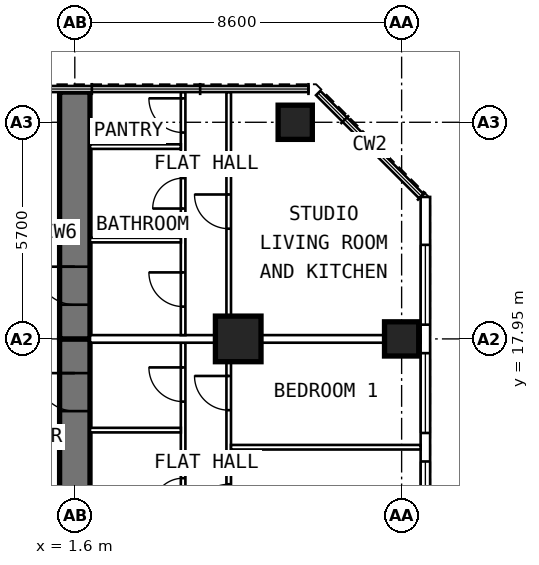
"""IFC4 building model, lengths in metres.
Left out: names, types, materials, properties, quantities, classifications, styles, units other than length and angle.
Written with IfcOpenShell. Run it as: python <this file> out.ifc"""

import sys

from ifc_helpers import new_model, si_unit, direction, frame, frame_2d, origin, origin_2d, place, context, subcontext, project, spatial, rectangle, extrude, element, fill, save


model = new_model("IFC4")
c1 = context("Model", 3, precision=1e-05, world=origin(), true_north=direction((0.0, 1.0)))
c2 = subcontext(c1, "Body", "Model", "MODEL_VIEW")
j1 = project(units=[si_unit("LENGTHUNIT", "METRE"), si_unit("PLANEANGLEUNIT", "RADIAN")], contexts=[c1])
p1 = place(None, origin())
s1 = spatial("IfcSite", under=j1, at=p1, CompositionType="ELEMENT")
p2 = place(p1, origin())
s2 = spatial("IfcBuilding", under=s1, at=p2, CompositionType="ELEMENT")
p3 = place(p2, frame((0.0, 0.0, 158.0)))
s3 = spatial("IfcBuildingStorey", under=s2, at=p3, CompositionType="ELEMENT", Elevation=158.0)
for number, where, z_axis, x_axis in (
    (1, (10.2, 17.95, 0.0), (0.0, 0.0, 1.0), (0.0, 1.0, 0.0)),
    (2, (7.4, 23.65, 0.0), (0.0, 0.0, 1.0), (0.0, 1.0, 0.0)),
):
    element("IfcColumn", number, at=place(p3, frame(where, z_axis=z_axis, x_axis=x_axis)), inside=s3, PredefinedType="COLUMN", context=c2, shape_type="SweptSolid", body=[
        extrude(rectangle(XDim=0.9, YDim=0.9, at=origin_2d()), origin(), (0.0, 0.0, 1.0), 3.6),
    ])
p4 = place(p3, frame((5.9, 17.95, 0.0), z_axis=(0.0, 0.0, 1.0), x_axis=(0.0, 1.0, 0.0)))
e3 = element("IfcColumn", 3, at=p4, inside=s3, PredefinedType="COLUMN", context=c2, shape_type="SweptSolid", body=[
    extrude(rectangle(XDim=1.2, YDim=1.2, at=origin_2d()), origin(), (0.0, 0.0, 1.0), 3.6),
])
p5 = place(p3, frame((1.6, 9.6, 0.0), z_axis=(0.0, 0.0, 1.0), x_axis=(0.0, 1.0, 0.0)))
e4 = element("IfcWall", 4, at=p5, inside=s3, PredefinedType="SHEAR", context=c2, shape_type="SweptSolid", body=[
    extrude(rectangle(XDim=8.35, YDim=0.8, at=frame_2d((4.175, 0.0))), origin(), (0.0, 0.0, 1.0), 3.6),
])
p6 = place(p5, frame((6.45, 0.0, 0.0)))
e5 = element("IfcOpeningElement", 5, at=p6, cuts=e4, PredefinedType="OPENING", context=c2, shape_type="SweptSolid", body=[
    extrude(rectangle(XDim=1.0, YDim=2.1, at=frame_2d((0.5, 1.05))), frame((0.0, 0.412, 0.0), z_axis=(0.0, -1.0, 0.0), x_axis=(1.0, 0.0, 0.0)), (0.0, 0.0, 1.0), 0.824),
])
p7 = place(p3, frame((1.6, 17.95, 0.0), z_axis=(0.0, 0.0, 1.0), x_axis=(0.0, 1.0, 0.0)))
e6 = element("IfcWall", 6, at=p7, inside=s3, PredefinedType="SHEAR", context=c2, shape_type="SweptSolid", body=[
    extrude(rectangle(XDim=6.495, YDim=0.8, at=frame_2d((3.248, 0.0))), origin(), (0.0, 0.0, 1.0), 3.6),
])
p8 = place(p7, frame((0.9, 0.0, 0.0)))
e7 = element("IfcOpeningElement", 7, at=p8, cuts=e6, PredefinedType="OPENING", context=c2, shape_type="SweptSolid", body=[
    extrude(rectangle(XDim=1.0, YDim=2.1, at=frame_2d((0.5, 1.05))), frame((0.0, 0.412, 0.0), z_axis=(0.0, -1.0, 0.0), x_axis=(1.0, 0.0, 0.0)), (0.0, 0.0, 1.0), 0.824),
])
p9 = place(p3, frame((10.825, 6.409, 0.0), z_axis=(0.0, 0.0, 1.0), x_axis=(0.0, 1.0, 0.0)))
e8 = element("IfcWall", 8, at=p9, inside=s3, PredefinedType="SOLIDWALL", context=c2, shape_type="SweptSolid", body=[
    extrude(rectangle(XDim=15.276, YDim=0.25, at=frame_2d((7.638, 0.0))), origin(), (0.0, 0.0, 1.0), 3.35),
])
p10 = place(p9, frame((0.516, 0.0, 0.8)))
e9 = element("IfcOpeningElement", 9, at=p10, cuts=e8, PredefinedType="OPENING", context=c2, shape_type="SweptSolid", body=[
    extrude(rectangle(XDim=2.1, YDim=1.8, at=frame_2d((1.05, 0.9))), frame((0.0, 0.137, 0.0), z_axis=(0.0, -1.0, 0.0), x_axis=(1.0, 0.0, 0.0)), (0.0, 0.0, 1.0), 0.274),
])
p11 = place(p9, frame((3.366, 0.0, 0.8)))
e10 = element("IfcOpeningElement", 10, at=p11, cuts=e8, PredefinedType="OPENING", context=c2, shape_type="SweptSolid", body=[
    extrude(rectangle(XDim=2.1, YDim=1.8, at=frame_2d((1.05, 0.9))), frame((0.0, 0.137, 0.0), z_axis=(0.0, -1.0, 0.0), x_axis=(1.0, 0.0, 0.0)), (0.0, 0.0, 1.0), 0.274),
])
p12 = place(p9, frame((6.216, 0.0, 0.8)))
e11 = element("IfcOpeningElement", 11, at=p12, cuts=e8, PredefinedType="OPENING", context=c2, shape_type="SweptSolid", body=[
    extrude(rectangle(XDim=2.1, YDim=1.8, at=frame_2d((1.05, 0.9))), frame((0.0, 0.137, 0.0), z_axis=(0.0, -1.0, 0.0), x_axis=(1.0, 0.0, 0.0)), (0.0, 0.0, 1.0), 0.274),
])
p13 = place(p9, frame((9.066, 0.0, 0.8)))
e12 = element("IfcOpeningElement", 12, at=p13, cuts=e8, PredefinedType="OPENING", context=c2, shape_type="SweptSolid", body=[
    extrude(rectangle(XDim=2.1, YDim=1.8, at=frame_2d((1.05, 0.9))), frame((0.0, 0.137, 0.0), z_axis=(0.0, -1.0, 0.0), x_axis=(1.0, 0.0, 0.0)), (0.0, 0.0, 1.0), 0.274),
])
p14 = place(p9, frame((11.916, 0.0, 0.8)))
e13 = element("IfcOpeningElement", 13, at=p14, cuts=e8, PredefinedType="OPENING", context=c2, shape_type="SweptSolid", body=[
    extrude(rectangle(XDim=2.1, YDim=1.8, at=frame_2d((1.05, 0.9))), frame((0.0, 0.137, 0.0), z_axis=(0.0, -1.0, 0.0), x_axis=(1.0, 0.0, 0.0)), (0.0, 0.0, 1.0), 0.274),
])
p15 = place(p3, frame((4.45, 10.05, 0.0), z_axis=(0.0, 0.0, 1.0), x_axis=(0.0, 1.0, 0.0)))
e14 = element("IfcWall", 14, at=p15, inside=s3, PredefinedType="PARTITIONING", context=c2, shape_type="SweptSolid", body=[
    extrude(rectangle(XDim=7.8, YDim=0.12, at=frame_2d((3.9, 0.0))), origin(), (0.0, 0.0, 1.0), 3.35),
])
p16 = place(p15, frame((0.61, 0.0, 0.0)))
e15 = element("IfcOpeningElement", 15, at=p16, cuts=e14, PredefinedType="OPENING", context=c2, shape_type="SweptSolid", body=[
    extrude(rectangle(XDim=0.9, YDim=2.1, at=frame_2d((0.45, 1.05))), frame((0.0, 0.072, 0.0), z_axis=(0.0, -1.0, 0.0), x_axis=(1.0, 0.0, 0.0)), (0.0, 0.0, 1.0), 0.144),
])
p17 = place(p15, frame((3.435, 0.0, 0.0)))
e16 = element("IfcOpeningElement", 16, at=p17, cuts=e14, PredefinedType="OPENING", context=c2, shape_type="SweptSolid", body=[
    extrude(rectangle(XDim=0.8, YDim=2.1, at=frame_2d((0.4, 1.05))), frame((0.0, 0.072, 0.0), z_axis=(0.0, -1.0, 0.0), x_axis=(1.0, 0.0, 0.0)), (0.0, 0.0, 1.0), 0.144),
])
p18 = place(p15, frame((6.25, 0.0, 0.0)))
e17 = element("IfcOpeningElement", 17, at=p18, cuts=e14, PredefinedType="OPENING", context=c2, shape_type="SweptSolid", body=[
    extrude(rectangle(XDim=0.9, YDim=2.1, at=frame_2d((0.45, 1.05))), frame((0.0, 0.072, 0.0), z_axis=(0.0, -1.0, 0.0), x_axis=(1.0, 0.0, 0.0)), (0.0, 0.0, 1.0), 0.144),
])
p19 = place(p3, frame((5.65, 9.6, 0.0), z_axis=(0.0, 0.0, 1.0), x_axis=(0.0, 1.0, 0.0)))
e18 = element("IfcWall", 18, at=p19, inside=s3, PredefinedType="PARTITIONING", context=c2, shape_type="SweptSolid", body=[
    extrude(rectangle(XDim=8.1, YDim=0.12, at=frame_2d((4.05, 0.0))), origin(), (0.0, 0.0, 1.0), 3.35),
])
p20 = place(p19, frame((1.0, 0.0, 0.0)))
e19 = element("IfcOpeningElement", 19, at=p20, cuts=e18, PredefinedType="OPENING", context=c2, shape_type="SweptSolid", body=[
    extrude(rectangle(XDim=0.9, YDim=2.1, at=frame_2d((0.45, 1.05))), frame((0.0, 0.072, 0.0), z_axis=(0.0, -1.0, 0.0), x_axis=(1.0, 0.0, 0.0)), (0.0, 0.0, 1.0), 0.144),
])
p21 = place(p19, frame((3.625, 0.0, 0.0)))
e20 = element("IfcOpeningElement", 20, at=p21, cuts=e18, PredefinedType="OPENING", context=c2, shape_type="SweptSolid", body=[
    extrude(rectangle(XDim=0.9, YDim=2.1, at=frame_2d((0.45, 1.05))), frame((0.0, 0.072, 0.0), z_axis=(0.0, -1.0, 0.0), x_axis=(1.0, 0.0, 0.0)), (0.0, 0.0, 1.0), 0.144),
])
p22 = place(p19, frame((6.475, 0.0, 0.0)))
e21 = element("IfcOpeningElement", 21, at=p22, cuts=e18, PredefinedType="OPENING", context=c2, shape_type="SweptSolid", body=[
    extrude(rectangle(XDim=0.9, YDim=2.1, at=frame_2d((0.45, 1.05))), frame((0.0, 0.072, 0.0), z_axis=(0.0, -1.0, 0.0), x_axis=(1.0, 0.0, 0.0)), (0.0, 0.0, 1.0), 0.144),
])
p23 = place(p3, frame((5.71, 15.1, 0.0), z_axis=(0.0, 0.0, 1.0), x_axis=(1.0, 0.0, 0.0)))
e22 = element("IfcWall", 22, at=p23, inside=s3, PredefinedType="PARTITIONING", context=c2, shape_type="SweptSolid", body=[
    extrude(rectangle(XDim=4.99, YDim=0.12, at=frame_2d((2.495, 0.0))), origin(), (0.0, 0.0, 1.0), 3.35),
])
p24 = place(p3, frame((2.0, 15.55, 0.0), z_axis=(0.0, 0.0, 1.0), x_axis=(1.0, 0.0, 0.0)))
e23 = element("IfcWall", 23, at=p24, inside=s3, PredefinedType="PARTITIONING", context=c2, shape_type="SweptSolid", body=[
    extrude(rectangle(XDim=2.39, YDim=0.12, at=frame_2d((1.195, 0.0))), origin(), (0.0, 0.0, 1.0), 3.35),
])
p25 = place(p3, frame((4.45, 18.05, 0.0), z_axis=(0.0, 0.0, 1.0), x_axis=(0.0, 1.0, 0.0)))
e24 = element("IfcWall", 24, at=p25, inside=s3, PredefinedType="PARTITIONING", context=c2, shape_type="SweptSolid", body=[
    extrude(rectangle(XDim=6.395, YDim=0.12, at=frame_2d((3.198, 0.0))), origin(), (0.0, 0.0, 1.0), 3.35),
])
p26 = place(p25, frame((0.75, 0.0, 0.0)))
e25 = element("IfcOpeningElement", 25, at=p26, cuts=e24, PredefinedType="OPENING", context=c2, shape_type="SweptSolid", body=[
    extrude(rectangle(XDim=0.9, YDim=2.1, at=frame_2d((0.45, 1.05))), frame((0.0, 0.072, 0.0), z_axis=(0.0, -1.0, 0.0), x_axis=(1.0, 0.0, 0.0)), (0.0, 0.0, 1.0), 0.144),
])
p27 = place(p25, frame((3.33, 0.0, 0.0)))
e26 = element("IfcOpeningElement", 26, at=p27, cuts=e24, PredefinedType="OPENING", context=c2, shape_type="SweptSolid", body=[
    extrude(rectangle(XDim=0.8, YDim=2.1, at=frame_2d((0.4, 1.05))), frame((0.0, 0.072, 0.0), z_axis=(0.0, -1.0, 0.0), x_axis=(1.0, 0.0, 0.0)), (0.0, 0.0, 1.0), 0.144),
])
p28 = place(p25, frame((5.33, 0.0, 0.0)))
e27 = element("IfcOpeningElement", 27, at=p28, cuts=e24, PredefinedType="OPENING", context=c2, shape_type="SweptSolid", body=[
    extrude(rectangle(XDim=0.9, YDim=2.1, at=frame_2d((0.45, 1.05))), frame((0.0, 0.072, 0.0), z_axis=(0.0, -1.0, 0.0), x_axis=(1.0, 0.0, 0.0)), (0.0, 0.0, 1.0), 0.144),
])
p29 = place(p3, frame((5.65, 18.05, 0.0), z_axis=(0.0, 0.0, 1.0), x_axis=(0.0, 1.0, 0.0)))
e28 = element("IfcWall", 28, at=p29, inside=s3, PredefinedType="PARTITIONING", context=c2, shape_type="SweptSolid", body=[
    extrude(rectangle(XDim=6.395, YDim=0.12, at=frame_2d((3.198, 0.0))), origin(), (0.0, 0.0, 1.0), 3.35),
])
p30 = place(p29, frame((2.8, 0.0, 0.0)))
e29 = element("IfcOpeningElement", 29, at=p30, cuts=e28, PredefinedType="OPENING", context=c2, shape_type="SweptSolid", body=[
    extrude(rectangle(XDim=0.9, YDim=2.1, at=frame_2d((0.45, 1.05))), frame((0.0, 0.072, 0.0), z_axis=(0.0, -1.0, 0.0), x_axis=(1.0, 0.0, 0.0)), (0.0, 0.0, 1.0), 0.144),
])
for number, where, z_axis, x_axis in (
    (30, (2.0, 20.55, 0.0), (0.0, 0.0, 1.0), (1.0, 0.0, 0.0)),
    (31, (2.0, 23.01, 0.0), (0.0, 0.0, 1.0), (1.0, 0.0, 0.0)),
):
    element("IfcWall", number, at=place(p3, frame(where, z_axis=z_axis, x_axis=x_axis)), inside=s3, PredefinedType="PARTITIONING", context=c2, shape_type="SweptSolid", body=[
        extrude(rectangle(XDim=2.39, YDim=0.12, at=frame_2d((1.195, 0.0))), origin(), (0.0, 0.0, 1.0), 3.35),
    ])
p31 = place(p3, frame((2.0, 17.95, 0.0), z_axis=(0.0, 0.0, 1.0), x_axis=(1.0, 0.0, 0.0)))
e32 = element("IfcWall", 32, at=p31, inside=s3, PredefinedType="PARTITIONING", context=c2, shape_type="SweptSolid", body=[
    extrude(rectangle(XDim=8.7, YDim=0.2, at=frame_2d((4.35, 0.0))), origin(), (0.0, 0.0, 1.0), 2.45),
])
p32 = place(p3, frame((1.2, 20.75, 0.0), z_axis=(0.0, 0.0, 1.0), x_axis=(-1.0, 0.0, 0.0)))
e33 = element("IfcWall", 33, at=p32, inside=s3, PredefinedType="PARTITIONING", context=c2, shape_type="SweptSolid", body=[
    extrude(rectangle(XDim=2.4, YDim=0.15, at=frame_2d((1.2, 0.0))), origin(), (0.0, 0.0, 1.0), 3.35),
])
p33 = place(p32, frame((0.7, 0.0, 0.0)))
e34 = element("IfcOpeningElement", 34, at=p33, cuts=e33, PredefinedType="OPENING", context=c2, shape_type="SweptSolid", body=[
    extrude(rectangle(XDim=1.0, YDim=2.1, at=frame_2d((0.5, 1.05))), frame((0.0, 0.087, 0.0), z_axis=(0.0, -1.0, 0.0), x_axis=(1.0, 0.0, 0.0)), (0.0, 0.0, 1.0), 0.174),
])
p34 = place(p12, origin())
e35 = element("IfcWindow", 35, at=p34, inside=s3, PartitioningType="SINGLE_PANEL", PredefinedType="WINDOW", context=c2, shape_type="SweptSolid", body=[
    extrude(rectangle(XDim=2.1, YDim=1.8, at=frame_2d((1.05, 0.9))), frame((0.0, 0.03, 0.0), z_axis=(0.0, -1.0, 0.0), x_axis=(1.0, 0.0, 0.0)), (0.0, 0.0, 1.0), 0.06),
])
fill(e11, e35)
p35 = place(p13, origin())
e36 = element("IfcWindow", 36, at=p35, inside=s3, PartitioningType="SINGLE_PANEL", PredefinedType="WINDOW", context=c2, shape_type="SweptSolid", body=[
    extrude(rectangle(XDim=2.1, YDim=1.8, at=frame_2d((1.05, 0.9))), frame((0.0, 0.03, 0.0), z_axis=(0.0, -1.0, 0.0), x_axis=(1.0, 0.0, 0.0)), (0.0, 0.0, 1.0), 0.06),
])
fill(e12, e36)
p36 = place(p14, origin())
e37 = element("IfcWindow", 37, at=p36, inside=s3, PartitioningType="SINGLE_PANEL", PredefinedType="WINDOW", context=c2, shape_type="SweptSolid", body=[
    extrude(rectangle(XDim=2.1, YDim=1.8, at=frame_2d((1.05, 0.9))), frame((0.0, 0.03, 0.0), z_axis=(0.0, -1.0, 0.0), x_axis=(1.0, 0.0, 0.0)), (0.0, 0.0, 1.0), 0.06),
])
fill(e13, e37)
p37 = place(p6, origin())
e38 = element("IfcDoor", 38, at=p37, inside=s3, OperationType="SINGLE_SWING_RIGHT", PredefinedType="DOOR", context=c2, shape_type="SweptSolid", body=[
    extrude(rectangle(XDim=1.0, YDim=2.1, at=frame_2d((0.5, 1.05))), frame((0.0, 0.15, 0.0), z_axis=(0.0, -1.0, 0.0), x_axis=(1.0, 0.0, 0.0)), (0.0, 0.0, 1.0), 0.3),
])
fill(e5, e38)
p38 = place(p21, origin())
e39 = element("IfcDoor", 39, at=p38, inside=s3, OperationType="SINGLE_SWING_LEFT", PredefinedType="DOOR", context=c2, shape_type="SweptSolid", body=[
    extrude(rectangle(XDim=0.9, YDim=2.1, at=frame_2d((0.45, 1.05))), frame((0.0, 0.025, 0.0), z_axis=(0.0, -1.0, 0.0), x_axis=(1.0, 0.0, 0.0)), (0.0, 0.0, 1.0), 0.05),
])
fill(e20, e39)
p39 = place(p22, origin())
e40 = element("IfcDoor", 40, at=p39, inside=s3, OperationType="SINGLE_SWING_RIGHT", PredefinedType="DOOR", context=c2, shape_type="SweptSolid", body=[
    extrude(rectangle(XDim=0.9, YDim=2.1, at=frame_2d((0.45, 1.05))), frame((0.0, 0.025, 0.0), z_axis=(0.0, -1.0, 0.0), x_axis=(1.0, 0.0, 0.0)), (0.0, 0.0, 1.0), 0.05),
])
fill(e21, e40)
p40 = place(p17, origin())
e41 = element("IfcDoor", 41, at=p40, inside=s3, OperationType="SINGLE_SWING_LEFT", PredefinedType="DOOR", context=c2, shape_type="SweptSolid", body=[
    extrude(rectangle(XDim=0.8, YDim=2.1, at=frame_2d((0.4, 1.05))), frame((0.0, 0.025, 0.0), z_axis=(0.0, -1.0, 0.0), x_axis=(1.0, 0.0, 0.0)), (0.0, 0.0, 1.0), 0.05),
])
fill(e16, e41)
p41 = place(p18, origin())
e42 = element("IfcDoor", 42, at=p41, inside=s3, OperationType="SINGLE_SWING_RIGHT", PredefinedType="DOOR", context=c2, shape_type="SweptSolid", body=[
    extrude(rectangle(XDim=0.9, YDim=2.1, at=frame_2d((0.45, 1.05))), frame((0.0, 0.025, 0.0), z_axis=(0.0, -1.0, 0.0), x_axis=(1.0, 0.0, 0.0)), (0.0, 0.0, 1.0), 0.05),
])
fill(e17, e42)
p42 = place(p8, origin())
e43 = element("IfcDoor", 43, at=p42, inside=s3, OperationType="SINGLE_SWING_RIGHT", PredefinedType="DOOR", context=c2, shape_type="SweptSolid", body=[
    extrude(rectangle(XDim=1.0, YDim=2.1, at=frame_2d((0.5, 1.05))), frame((0.0, 0.15, 0.0), z_axis=(0.0, -1.0, 0.0), x_axis=(1.0, 0.0, 0.0)), (0.0, 0.0, 1.0), 0.3),
])
fill(e7, e43)
p43 = place(p30, origin())
e44 = element("IfcDoor", 44, at=p43, inside=s3, OperationType="SINGLE_SWING_RIGHT", PredefinedType="DOOR", context=c2, shape_type="SweptSolid", body=[
    extrude(rectangle(XDim=0.9, YDim=2.1, at=frame_2d((0.45, 1.05))), frame((0.0, 0.025, 0.0), z_axis=(0.0, -1.0, 0.0), x_axis=(1.0, 0.0, 0.0)), (0.0, 0.0, 1.0), 0.05),
])
fill(e29, e44)
p44 = place(p26, origin())
e45 = element("IfcDoor", 45, at=p44, inside=s3, OperationType="SINGLE_SWING_RIGHT", PredefinedType="DOOR", context=c2, shape_type="SweptSolid", body=[
    extrude(rectangle(XDim=0.9, YDim=2.1, at=frame_2d((0.45, 1.05))), frame((0.0, 0.025, 0.0), z_axis=(0.0, -1.0, 0.0), x_axis=(1.0, 0.0, 0.0)), (0.0, 0.0, 1.0), 0.05),
])
fill(e25, e45)
p45 = place(p27, origin())
e46 = element("IfcDoor", 46, at=p45, inside=s3, OperationType="SINGLE_SWING_LEFT", PredefinedType="DOOR", context=c2, shape_type="SweptSolid", body=[
    extrude(rectangle(XDim=0.8, YDim=2.1, at=frame_2d((0.4, 1.05))), frame((0.0, 0.025, 0.0), z_axis=(0.0, -1.0, 0.0), x_axis=(1.0, 0.0, 0.0)), (0.0, 0.0, 1.0), 0.05),
])
fill(e26, e46)
p46 = place(p28, origin())
e47 = element("IfcDoor", 47, at=p46, inside=s3, OperationType="SINGLE_SWING_RIGHT", PredefinedType="DOOR", context=c2, shape_type="SweptSolid", body=[
    extrude(rectangle(XDim=0.9, YDim=2.1, at=frame_2d((0.45, 1.05))), frame((0.0, 0.025, 0.0), z_axis=(0.0, -1.0, 0.0), x_axis=(1.0, 0.0, 0.0)), (0.0, 0.0, 1.0), 0.05),
])
fill(e27, e47)
save(model, sys.argv[1])
